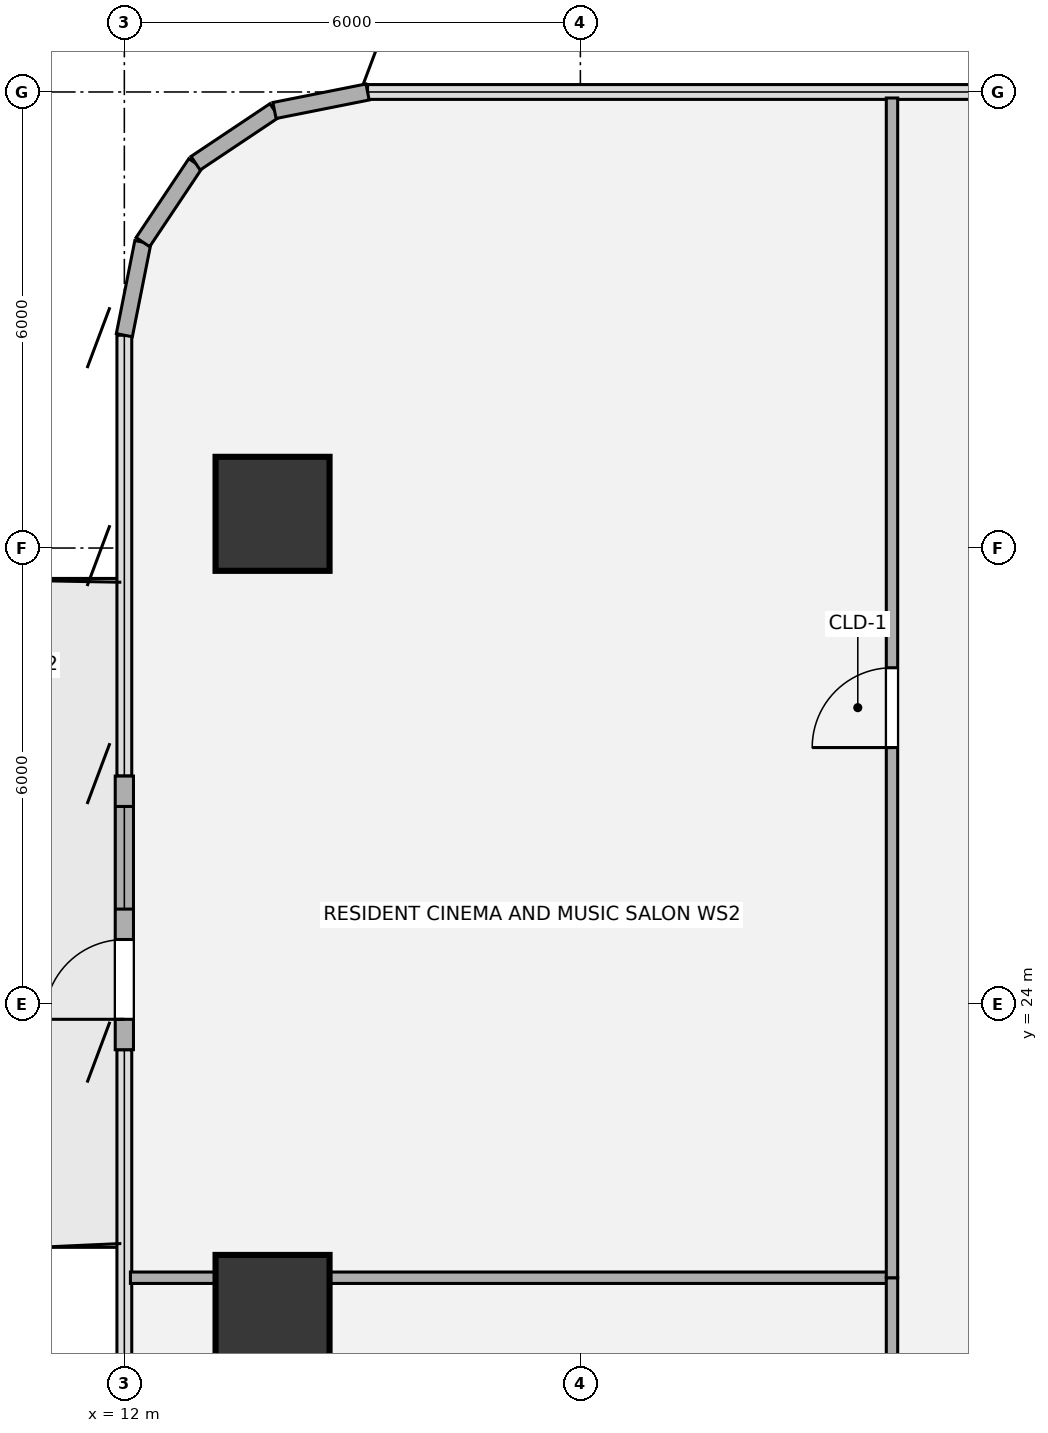
"""IFC4 building model, lengths in metres.
Left out: names, types, materials, properties, quantities, classifications, styles, units other than length and angle.
Written with IfcOpenShell. Run it as: python <this file> out.ifc"""

import sys

from ifc_helpers import new_model, si_unit, direction, frame, frame_2d, origin, origin_2d, place, context, subcontext, project, spatial, rectangle, hollow_circle, extrude, source, transform, mapped, element, fill, save


model = new_model("IFC4")
c1 = context("Model", 3, precision=1e-05, world=origin(), true_north=direction((0.0, 1.0)))
c2 = subcontext(c1, "Body", "Model", "MODEL_VIEW")
j1 = project(units=[si_unit("LENGTHUNIT", "METRE"), si_unit("PLANEANGLEUNIT", "RADIAN")], contexts=[c1])
p1 = place(None, origin())
s1 = spatial("IfcSite", under=j1, at=p1, CompositionType="ELEMENT")
p2 = place(p1, origin())
s2 = spatial("IfcBuilding", under=s1, at=p2, CompositionType="ELEMENT")
p3 = place(p2, frame((0.0, 0.0, 61.02)))
s3 = spatial("IfcBuildingStorey", under=s2, at=p3, CompositionType="ELEMENT", Elevation=61.02)
m1 = source(origin(), c2, "Body", "SweptSolid", [
    extrude(hollow_circle(Radius=0.75, WallThickness=0.05, at=origin_2d()), origin(), (0.0, 0.0, 1.0), 3.78),
])
for number, where, z_axis, x_axis in (
    (1, (13.95, 19.95, 0.0), (0.0, 0.0, 1.0), (1.0, 0.0, 0.0)),
    (2, (13.95, 30.45, 0.0), (0.0, 0.0, 1.0), (1.0, 0.0, 0.0)),
):
    element("IfcColumn", number, at=place(p3, frame(where, z_axis=z_axis, x_axis=x_axis)), inside=s3, PredefinedType="COLUMN", context=c2, shape_type="MappedRepresentation", body=[
        mapped(m1, transform((0.0, 0.0, 0.0), x_axis=(1.0, 0.0, 0.0), y_axis=(0.0, 1.0, 0.0), z_axis=(0.0, 0.0, 1.0), scale=1.0)),
    ])
p4 = place(p3, frame((12.0, 23.4, 0.0), z_axis=(0.0, 0.0, 1.0), x_axis=(0.0, 1.0, 0.0)))
e3 = element("IfcWall", 3, at=p4, inside=s3, PredefinedType="SOLIDWALL", context=c2, shape_type="SweptSolid", body=[
    extrude(rectangle(XDim=3.6, YDim=0.24, at=frame_2d((1.8, 0.0))), origin(), (0.0, 0.0, 1.0), 3.53),
])
p5 = place(p4, frame((0.4, 0.0, 0.0)))
e4 = element("IfcOpeningElement", 4, at=p5, cuts=e3, PredefinedType="OPENING", context=c2, shape_type="SweptSolid", body=[
    extrude(rectangle(XDim=1.05, YDim=2.15, at=origin_2d()), frame((0.525, 0.13, 1.075), z_axis=(0.0, -1.0, 0.0), x_axis=(1.0, 0.0, 0.0)), (0.0, 0.0, 1.0), 0.26),
])
p6 = place(p4, frame((1.85, 0.0, 0.85)))
e5 = element("IfcOpeningElement", 5, at=p6, cuts=e3, PredefinedType="OPENING", context=c2, shape_type="SweptSolid", body=[
    extrude(rectangle(XDim=1.35, YDim=1.35, at=origin_2d()), frame((0.675, 0.13, 0.675), z_axis=(0.0, -1.0, 0.0), x_axis=(1.0, 0.0, 0.0)), (0.0, 0.0, 1.0), 0.26),
])
for number, where, z_axis, x_axis in (
    (6, (12.0, 32.8, 0.0), (0.0, 0.0, 1.0), (0.195, 0.981, 0.0)),
    (7, (12.244, 34.025, 0.0), (0.0, 0.0, 1.0), (0.556, 0.831, 0.0)),
    (8, (12.937, 35.063, 0.0), (0.0, 0.0, 1.0), (0.831, 0.556, 0.0)),
    (9, (13.975, 35.756, 0.0), (0.0, 0.0, 1.0), (0.981, 0.195, 0.0)),
):
    element("IfcWall", number, at=place(p3, frame(where, z_axis=z_axis, x_axis=x_axis)), inside=s3, PredefinedType="SOLIDWALL", context=c2, shape_type="SweptSolid", body=[
        extrude(rectangle(XDim=1.249, YDim=0.215, at=frame_2d((0.624, 0.0))), origin(), (0.0, 0.0, 1.0), 3.53),
    ])
p7 = place(p3, frame((12.08, 20.4, 0.0), z_axis=(0.0, 0.0, 1.0), x_axis=(1.0, 0.0, 0.0)))
e10 = element("IfcWall", 10, at=p7, inside=s3, PredefinedType="PARTITIONING", context=c2, shape_type="SweptSolid", body=[
    extrude(rectangle(XDim=10.02, YDim=0.15, at=frame_2d((5.01, 0.0))), origin(), (0.0, 0.0, 1.0), 2.982),
])
p8 = place(p3, frame((22.1, 6.08, 0.0), z_axis=(0.0, 0.0, 1.0), x_axis=(0.0, 1.0, 0.0)))
e11 = element("IfcWall", 11, at=p8, inside=s3, PredefinedType="PARTITIONING", context=c2, shape_type="SweptSolid", body=[
    extrude(rectangle(XDim=14.32, YDim=0.15, at=frame_2d((7.16, 0.0))), origin(), (0.0, 0.0, 1.0), 3.5),
])
p9 = place(p8, frame((6.635, 0.0, 0.0)))
e12 = element("IfcOpeningElement", 12, at=p9, cuts=e11, PredefinedType="OPENING", context=c2, shape_type="SweptSolid", body=[
    extrude(rectangle(XDim=1.05, YDim=2.1, at=origin_2d()), frame((0.525, 0.085, 1.05), z_axis=(0.0, -1.0, 0.0), x_axis=(1.0, 0.0, 0.0)), (0.0, 0.0, 1.0), 0.17),
])
p10 = place(p3, frame((22.1, 20.4, 0.0), z_axis=(0.0, 0.0, 1.0), x_axis=(0.0, 1.0, 0.0)))
e13 = element("IfcWall", 13, at=p10, inside=s3, PredefinedType="PARTITIONING", context=c2, shape_type="SweptSolid", body=[
    extrude(rectangle(XDim=15.521, YDim=0.15, at=frame_2d((7.76, 0.0))), origin(), (0.0, 0.0, 1.0), 3.5),
])
p11 = place(p10, frame((6.975, 0.0, 0.0)))
e14 = element("IfcOpeningElement", 14, at=p11, cuts=e13, PredefinedType="OPENING", context=c2, shape_type="SweptSolid", body=[
    extrude(rectangle(XDim=1.05, YDim=2.1, at=origin_2d()), frame((0.525, 0.085, 1.05), z_axis=(0.0, -1.0, 0.0), x_axis=(1.0, 0.0, 0.0)), (0.0, 0.0, 1.0), 0.17),
])
m2 = source(origin(), c2, "Body", "SweptSolid", [
    extrude(rectangle(XDim=1.05, YDim=2.15, at=origin_2d()), frame((0.525, 0.025, 1.075), z_axis=(0.0, -1.0, 0.0), x_axis=(1.0, 0.0, 0.0)), (0.0, 0.0, 1.0), 0.05),
])
p12 = place(p5, origin())
e15 = element("IfcDoor", 15, at=p12, inside=s3, OperationType="SINGLE_SWING_LEFT", PredefinedType="DOOR", context=c2, shape_type="MappedRepresentation", body=[
    mapped(m2, transform((0.0, 0.0, 0.0), x_axis=(1.0, 0.0, 0.0), y_axis=(0.0, 1.0, 0.0), z_axis=(0.0, 0.0, 1.0), scale=1.0)),
])
fill(e4, e15)
m3 = source(origin(), c2, "Body", "SweptSolid", [
    extrude(rectangle(XDim=1.35, YDim=1.35, at=origin_2d()), frame((0.675, 0.03, 0.675), z_axis=(0.0, -1.0, 0.0), x_axis=(1.0, 0.0, 0.0)), (0.0, 0.0, 1.0), 0.06),
])
p13 = place(p6, origin())
e16 = element("IfcWindow", 16, at=p13, inside=s3, PartitioningType="SINGLE_PANEL", PredefinedType="WINDOW", context=c2, shape_type="MappedRepresentation", body=[
    mapped(m3, transform((0.0, 0.0, 0.0), x_axis=(1.0, 0.0, 0.0), y_axis=(0.0, 1.0, 0.0), z_axis=(0.0, 0.0, 1.0), scale=1.0)),
])
fill(e5, e16)
m4 = source(origin(), c2, "Body", "SweptSolid", [
    extrude(rectangle(XDim=1.05, YDim=2.1, at=origin_2d()), frame((0.525, 0.025, 1.05), z_axis=(0.0, -1.0, 0.0), x_axis=(1.0, 0.0, 0.0)), (0.0, 0.0, 1.0), 0.05),
])
p14 = place(p11, origin())
e17 = element("IfcDoor", 17, at=p14, inside=s3, OperationType="SINGLE_SWING_LEFT", PredefinedType="DOOR", context=c2, shape_type="MappedRepresentation", body=[
    mapped(m4, transform((0.0, 0.0, 0.0), x_axis=(1.0, 0.0, 0.0), y_axis=(0.0, 1.0, 0.0), z_axis=(0.0, 0.0, 1.0), scale=1.0)),
])
fill(e14, e17)
save(model, sys.argv[1])
